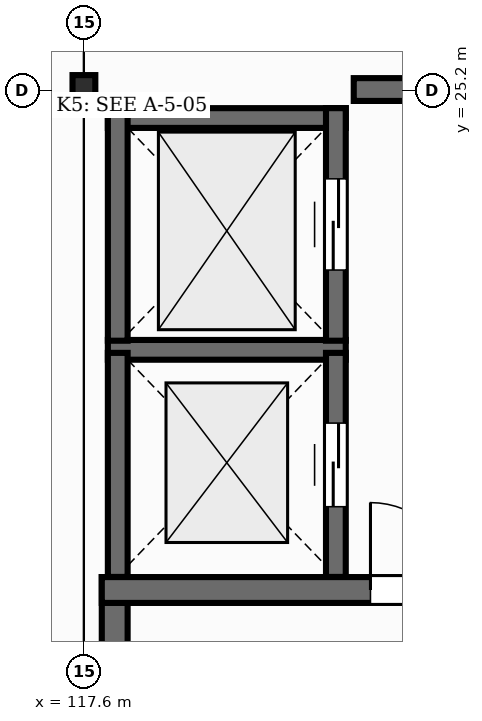
"""IFC4 building model, lengths in metres.
Left out: names, types, materials, properties, quantities, classifications, styles, units other than length and angle.
Written with IfcOpenShell. Run it as: python <this file> out.ifc"""

import sys

from ifc_helpers import new_model, si_unit, direction, frame, frame_2d, origin, origin_2d, place, context, subcontext, project, spatial, rectangle, i_section, extrude, element, fill, save


model = new_model("IFC4")
c1 = context("Model", 3, precision=1e-05, world=origin(), true_north=direction((0.0, 1.0)))
c2 = subcontext(c1, "Body", "Model", "MODEL_VIEW")
j1 = project(units=[si_unit("LENGTHUNIT", "METRE"), si_unit("PLANEANGLEUNIT", "RADIAN")], contexts=[c1])
p1 = place(None, origin())
s1 = spatial("IfcSite", under=j1, at=p1, CompositionType="ELEMENT")
p2 = place(p1, origin())
s2 = spatial("IfcBuilding", under=s1, at=p2, CompositionType="ELEMENT")
p3 = place(p2, frame((0.0, 0.0, 5.4)))
s3 = spatial("IfcBuildingStorey", under=s2, at=p3, CompositionType="ELEMENT", Elevation=5.4)
p4 = place(p3, frame((117.6, 25.2, 0.0), z_axis=(0.0, 0.0, 1.0), x_axis=(1.0, 0.0, 0.0)))
e1 = element("IfcColumn", 1, at=p4, inside=s3, PredefinedType="COLUMN", context=c2, shape_type="SweptSolid", body=[
    extrude(i_section(OverallWidth=0.3, OverallDepth=0.4, WebThickness=0.013, FlangeThickness=0.024, FilletRadius=0.027, at=origin_2d()), origin(), (0.0, 0.0, 1.0), 4.5),
])
p5 = place(p3, frame((118.005, 8.805, 0.0), z_axis=(0.0, 0.0, 1.0), x_axis=(0.0, 1.0, 0.0)))
e2 = element("IfcWall", 2, at=p5, inside=s3, PredefinedType="SHEAR", context=c2, shape_type="SweptSolid", body=[
    extrude(rectangle(XDim=9.99, YDim=0.34, at=frame_2d((4.995, 0.0))), origin(), (0.0, 0.0, 1.0), 4.29),
])
p6 = place(p3, frame((117.835, 18.625, 0.0), z_axis=(0.0, 0.0, 1.0), x_axis=(1.0, 0.0, 0.0)))
e3 = element("IfcWall", 3, at=p6, inside=s3, PredefinedType="SHEAR", context=c2, shape_type="SweptSolid", body=[
    extrude(rectangle(XDim=5.25, YDim=0.34, at=frame_2d((2.625, 0.0))), origin(), (0.0, 0.0, 1.0), 4.29),
])
p7 = place(p6, frame((3.535, 0.0, 0.0)))
e4 = element("IfcOpeningElement", 4, at=p7, cuts=e3, PredefinedType="OPENING", context=c2, shape_type="SweptSolid", body=[
    extrude(rectangle(XDim=1.15, YDim=2.15, at=frame_2d((0.575, 1.075))), frame((0.0, 0.18, 0.0), z_axis=(0.0, -1.0, 0.0), x_axis=(1.0, 0.0, 0.0)), (0.0, 0.0, 1.0), 0.36),
])
p8 = place(p3, frame((117.915, 21.785, 0.0), z_axis=(0.0, 0.0, 1.0), x_axis=(1.0, 0.0, 0.0)))
e5 = element("IfcWall", 5, at=p8, inside=s3, PredefinedType="SHEAR", context=c2, shape_type="SweptSolid", body=[
    extrude(rectangle(XDim=3.13, YDim=0.26, at=frame_2d((1.565, 0.0))), origin(), (0.0, 0.0, 1.0), 4.29),
])
p9 = place(p3, frame((118.045, 18.797, 0.0), z_axis=(0.0, 0.0, 1.0), x_axis=(0.0, 1.0, 0.0)))
e6 = element("IfcWall", 6, at=p9, inside=s3, PredefinedType="SHEAR", context=c2, shape_type="SweptSolid", body=[
    extrude(rectangle(XDim=2.948, YDim=0.26, at=frame_2d((1.474, 0.0))), origin(), (0.0, 0.0, 1.0), 4.29),
])
p10 = place(p3, frame((120.915, 18.797, 0.0), z_axis=(0.0, 0.0, 1.0), x_axis=(0.0, 1.0, 0.0)))
e7 = element("IfcWall", 7, at=p10, inside=s3, PredefinedType="SHEAR", context=c2, shape_type="SweptSolid", body=[
    extrude(rectangle(XDim=2.948, YDim=0.26, at=frame_2d((1.474, 0.0))), origin(), (0.0, 0.0, 1.0), 4.29),
])
p11 = place(p10, frame((0.924, 0.0, 0.0)))
e8 = element("IfcOpeningElement", 8, at=p11, cuts=e7, PredefinedType="OPENING", context=c2, shape_type="SweptSolid", body=[
    extrude(rectangle(XDim=1.1, YDim=2.15, at=frame_2d((0.55, 1.075))), frame((0.0, 0.14, 0.0), z_axis=(0.0, -1.0, 0.0), x_axis=(1.0, 0.0, 0.0)), (0.0, 0.0, 1.0), 0.28),
])
p12 = place(p3, frame((117.915, 24.835, 0.0), z_axis=(0.0, 0.0, 1.0), x_axis=(1.0, 0.0, 0.0)))
e9 = element("IfcWall", 9, at=p12, inside=s3, PredefinedType="SHEAR", context=c2, shape_type="SweptSolid", body=[
    extrude(rectangle(XDim=3.13, YDim=0.26, at=frame_2d((1.565, 0.0))), origin(), (0.0, 0.0, 1.0), 4.29),
])
p13 = place(p3, frame((118.045, 21.905, 0.0), z_axis=(0.0, 0.0, 1.0), x_axis=(0.0, 1.0, 0.0)))
e10 = element("IfcWall", 10, at=p13, inside=s3, PredefinedType="SHEAR", context=c2, shape_type="SweptSolid", body=[
    extrude(rectangle(XDim=3.06, YDim=0.26, at=frame_2d((1.53, 0.0))), origin(), (0.0, 0.0, 1.0), 4.29),
])
p14 = place(p3, frame((120.915, 21.905, 0.0), z_axis=(0.0, 0.0, 1.0), x_axis=(0.0, 1.0, 0.0)))
e11 = element("IfcWall", 11, at=p14, inside=s3, PredefinedType="SHEAR", context=c2, shape_type="SweptSolid", body=[
    extrude(rectangle(XDim=3.06, YDim=0.26, at=frame_2d((1.53, 0.0))), origin(), (0.0, 0.0, 1.0), 4.29),
])
p15 = place(p14, frame((0.93, 0.0, 0.0)))
e12 = element("IfcOpeningElement", 12, at=p15, cuts=e11, PredefinedType="OPENING", context=c2, shape_type="SweptSolid", body=[
    extrude(rectangle(XDim=1.2, YDim=2.15, at=frame_2d((0.6, 1.075))), frame((0.0, 0.14, 0.0), z_axis=(0.0, -1.0, 0.0), x_axis=(1.0, 0.0, 0.0)), (0.0, 0.0, 1.0), 0.28),
])
p16 = place(p3, frame((121.15, 25.21, 0.0), z_axis=(0.0, 0.0, 1.0), x_axis=(1.0, 0.0, 0.0)))
e13 = element("IfcWall", 13, at=p16, inside=s3, PredefinedType="SHEAR", context=c2, shape_type="SweptSolid", body=[
    extrude(rectangle(XDim=4.87, YDim=0.3, at=frame_2d((2.435, 0.0))), origin(), (0.0, 0.0, 1.0), 4.29),
])
p17 = place(p7, origin())
e14 = element("IfcDoor", 14, at=p17, inside=s3, OperationType="SINGLE_SWING_LEFT", PredefinedType="DOOR", context=c2, shape_type="SweptSolid", body=[
    extrude(rectangle(XDim=1.15, YDim=2.15, at=frame_2d((0.575, 1.075))), frame((0.0, 0.025, 0.0), z_axis=(0.0, -1.0, 0.0), x_axis=(1.0, 0.0, 0.0)), (0.0, 0.0, 1.0), 0.05),
])
fill(e4, e14)
p18 = place(p11, origin())
e15 = element("IfcDoor", 15, at=p18, inside=s3, OperationType="DOUBLE_DOOR_SLIDING", PredefinedType="DOOR", context=c2, shape_type="SweptSolid", body=[
    extrude(rectangle(XDim=1.1, YDim=2.15, at=frame_2d((0.55, 1.075))), frame((0.0, 0.025, 0.0), z_axis=(0.0, -1.0, 0.0), x_axis=(1.0, 0.0, 0.0)), (0.0, 0.0, 1.0), 0.05),
])
fill(e8, e15)
p19 = place(p15, origin())
e16 = element("IfcDoor", 16, at=p19, inside=s3, OperationType="DOUBLE_DOOR_SLIDING", PredefinedType="DOOR", context=c2, shape_type="SweptSolid", body=[
    extrude(rectangle(XDim=1.2, YDim=2.15, at=frame_2d((0.6, 1.075))), frame((0.0, 0.025, 0.0), z_axis=(0.0, -1.0, 0.0), x_axis=(1.0, 0.0, 0.0)), (0.0, 0.0, 1.0), 0.05),
])
fill(e12, e16)
save(model, sys.argv[1])
